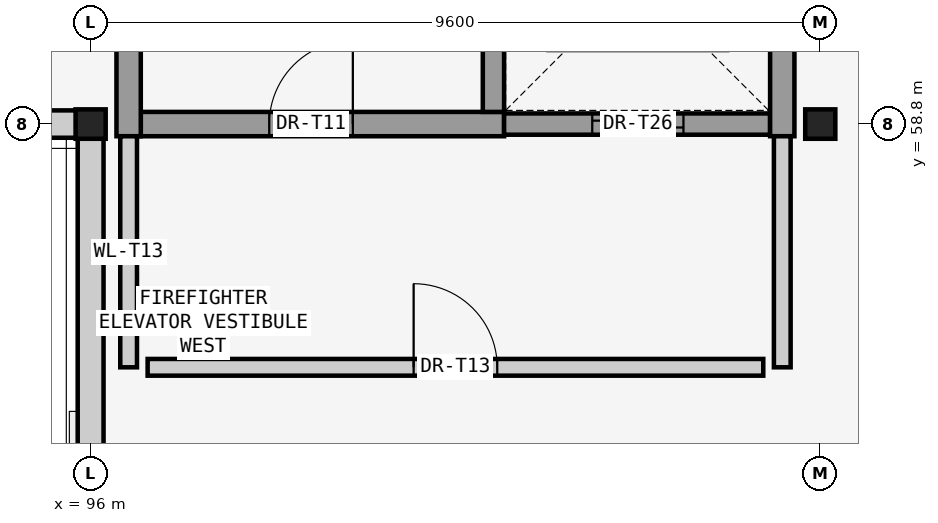
"""IFC4 building model, lengths in metres.
Left out: names, types, materials, properties, quantities, classifications, styles, units other than length and angle.
Written with IfcOpenShell. Run it as: python <this file> out.ifc"""

import sys

from ifc_helpers import new_model, si_unit, direction, frame, frame_2d, origin, origin_2d, place, context, subcontext, project, spatial, rectangle, i_section, extrude, element, fill, save


model = new_model("IFC4")
c1 = context("Model", 3, precision=1e-05, world=origin(), true_north=direction((0.0, 1.0)))
c2 = subcontext(c1, "Body", "Model", "MODEL_VIEW")
j1 = project(units=[si_unit("LENGTHUNIT", "METRE"), si_unit("PLANEANGLEUNIT", "RADIAN")], contexts=[c1])
p1 = place(None, origin())
s1 = spatial("IfcSite", under=j1, at=p1, CompositionType="ELEMENT")
p2 = place(p1, origin())
s2 = spatial("IfcBuilding", under=s1, at=p2, CompositionType="ELEMENT")
p3 = place(p2, frame((0.0, 0.0, 24.6)))
s3 = spatial("IfcBuildingStorey", under=s2, at=p3, CompositionType="ELEMENT", Elevation=24.6)
for number, where, z_axis, x_axis in (
    (1, (96.0, 58.8, 0.0), (0.0, 0.0, 1.0), (1.0, 0.0, 0.0)),
    (2, (105.6, 58.8, 0.0), (0.0, 0.0, 1.0), (1.0, 0.0, 0.0)),
):
    element("IfcColumn", number, at=place(p3, frame(where, z_axis=z_axis, x_axis=x_axis)), inside=s3, PredefinedType="COLUMN", context=c2, shape_type="SweptSolid", body=[
        extrude(i_section(OverallWidth=0.396, OverallDepth=0.387, WebThickness=0.025, FlangeThickness=0.038, at=origin_2d()), origin(), (0.0, 0.0, 1.0), 6.32),
    ])
p4 = place(p3, frame((95.98, 58.8, 0.0), z_axis=(0.0, 0.0, 1.0), x_axis=(-1.0, 0.0, 0.0)))
e3 = element("IfcWall", 3, at=p4, inside=s3, PredefinedType="SOLIDWALL", context=c2, shape_type="SweptSolid", body=[
    extrude(rectangle(XDim=9.575, YDim=0.36, at=frame_2d((4.788, 0.0))), origin(), (0.0, 0.0, 1.0), 5.366),
])
p5 = place(p3, frame((96.0, 50.7, 0.0), z_axis=(0.0, 0.0, 1.0), x_axis=(0.0, 1.0, 0.0)))
e4 = element("IfcWall", 4, at=p5, inside=s3, PredefinedType="SOLIDWALL", context=c2, shape_type="SweptSolid", body=[
    extrude(rectangle(XDim=8.08, YDim=0.34, at=frame_2d((4.04, 0.0))), origin(), (0.0, 0.0, 1.0), 6.31),
])
p6 = place(p3, frame((96.66, 58.8, 0.0), z_axis=(0.0, 0.0, 1.0), x_axis=(1.0, 0.0, 0.0)))
e5 = element("IfcWall", 5, at=p6, inside=s3, PredefinedType="SHEAR", context=c2, shape_type="SweptSolid", body=[
    extrude(rectangle(XDim=4.78, YDim=0.32, at=frame_2d((2.39, 0.0))), origin(), (0.0, 0.0, 1.0), 6.3),
])
p7 = place(p6, frame((1.69, 0.0, 0.0)))
e6 = element("IfcOpeningElement", 6, at=p7, cuts=e5, PredefinedType="OPENING", context=c2, shape_type="SweptSolid", body=[
    extrude(rectangle(XDim=1.1, YDim=2.2, at=frame_2d((0.55, 1.1))), frame((0.0, 0.17, 0.0), z_axis=(0.0, -1.0, 0.0), x_axis=(1.0, 0.0, 0.0)), (0.0, 0.0, 1.0), 0.34),
])
p8 = place(p3, frame((101.44, 58.8, 0.0), z_axis=(0.0, 0.0, 1.0), x_axis=(1.0, 0.0, 0.0)))
e7 = element("IfcWall", 7, at=p8, inside=s3, PredefinedType="SHEAR", context=c2, shape_type="SweptSolid", body=[
    extrude(rectangle(XDim=3.5, YDim=0.28, at=frame_2d((1.75, 0.0))), origin(), (0.0, 0.0, 1.0), 6.3),
])
p9 = place(p8, frame((1.16, 0.0, 0.0)))
e8 = element("IfcOpeningElement", 8, at=p9, cuts=e7, PredefinedType="OPENING", context=c2, shape_type="SweptSolid", body=[
    extrude(rectangle(XDim=1.2, YDim=2.2, at=frame_2d((0.6, 1.1))), frame((0.0, 0.15, 0.0), z_axis=(0.0, -1.0, 0.0), x_axis=(1.0, 0.0, 0.0)), (0.0, 0.0, 1.0), 0.3),
])
for number, where, z_axis, x_axis in (
    (9, (96.5, 67.0, 0.0), (0.0, 0.0, 1.0), (0.0, -1.0, 0.0)),
    (10, (105.1, 58.64, 0.0), (0.0, 0.0, 1.0), (0.0, 1.0, 0.0)),
):
    element("IfcWall", number, at=place(p3, frame(where, z_axis=z_axis, x_axis=x_axis)), inside=s3, PredefinedType="SHEAR", context=c2, shape_type="SweptSolid", body=[
        extrude(rectangle(XDim=8.36, YDim=0.32, at=frame_2d((4.18, 0.0))), origin(), (0.0, 0.0, 1.0), 6.3),
    ])
p10 = place(p3, frame((101.3, 58.96, 0.0), z_axis=(0.0, 0.0, 1.0), x_axis=(0.0, 1.0, 0.0)))
e11 = element("IfcWall", 11, at=p10, inside=s3, PredefinedType="SHEAR", context=c2, shape_type="SweptSolid", body=[
    extrude(rectangle(XDim=7.72, YDim=0.28, at=frame_2d((3.86, 0.0))), origin(), (0.0, 0.0, 1.0), 6.3),
])
for number, where, z_axis, x_axis in (
    (12, (96.5, 55.6, 0.0), (0.0, 0.0, 1.0), (0.0, 1.0, 0.0)),
    (13, (105.1, 55.6, 0.0), (0.0, 0.0, 1.0), (0.0, 1.0, 0.0)),
):
    element("IfcWall", number, at=place(p3, frame(where, z_axis=z_axis, x_axis=x_axis)), inside=s3, PredefinedType="SOLIDWALL", context=c2, shape_type="SweptSolid", body=[
        extrude(rectangle(XDim=3.04, YDim=0.22, at=frame_2d((1.52, 0.0))), origin(), (0.0, 0.0, 1.0), 6.12),
    ])
p11 = place(p3, frame((96.75, 55.6, 0.0), z_axis=(0.0, 0.0, 1.0), x_axis=(1.0, 0.0, 0.0)))
e14 = element("IfcWall", 14, at=p11, inside=s3, PredefinedType="SOLIDWALL", context=c2, shape_type="SweptSolid", body=[
    extrude(rectangle(XDim=8.1, YDim=0.22, at=frame_2d((4.05, 0.0))), origin(), (0.0, 0.0, 1.0), 6.12),
])
p12 = place(p11, frame((3.5, 0.0, 0.0)))
e15 = element("IfcOpeningElement", 15, at=p12, cuts=e14, PredefinedType="OPENING", context=c2, shape_type="SweptSolid", body=[
    extrude(rectangle(XDim=1.1, YDim=2.2, at=frame_2d((0.55, 1.1))), frame((0.0, 0.12, 0.0), z_axis=(0.0, -1.0, 0.0), x_axis=(1.0, 0.0, 0.0)), (0.0, 0.0, 1.0), 0.24),
])
p13 = place(p7, origin())
e16 = element("IfcDoor", 16, at=p13, inside=s3, OperationType="SINGLE_SWING_RIGHT", PredefinedType="DOOR", context=c2, shape_type="SweptSolid", body=[
    extrude(rectangle(XDim=1.1, YDim=2.2, at=frame_2d((0.55, 1.1))), frame((0.0, 0.025, 0.0), z_axis=(0.0, -1.0, 0.0), x_axis=(1.0, 0.0, 0.0)), (0.0, 0.0, 1.0), 0.05),
])
fill(e6, e16)
p14 = place(p9, origin())
e17 = element("IfcDoor", 17, at=p14, inside=s3, OperationType="SLIDING_TO_RIGHT", PredefinedType="DOOR", context=c2, shape_type="SweptSolid", body=[
    extrude(rectangle(XDim=1.2, YDim=2.2, at=frame_2d((0.6, 1.1))), frame((0.0, 0.025, 0.0), z_axis=(0.0, -1.0, 0.0), x_axis=(1.0, 0.0, 0.0)), (0.0, 0.0, 1.0), 0.05),
])
fill(e8, e17)
p15 = place(p12, origin())
e18 = element("IfcDoor", 18, at=p15, inside=s3, OperationType="SINGLE_SWING_LEFT", PredefinedType="DOOR", context=c2, shape_type="SweptSolid", body=[
    extrude(rectangle(XDim=1.1, YDim=2.2, at=frame_2d((0.55, 1.1))), frame((0.0, 0.025, 0.0), z_axis=(0.0, -1.0, 0.0), x_axis=(1.0, 0.0, 0.0)), (0.0, 0.0, 1.0), 0.05),
])
fill(e15, e18)
save(model, sys.argv[1])
